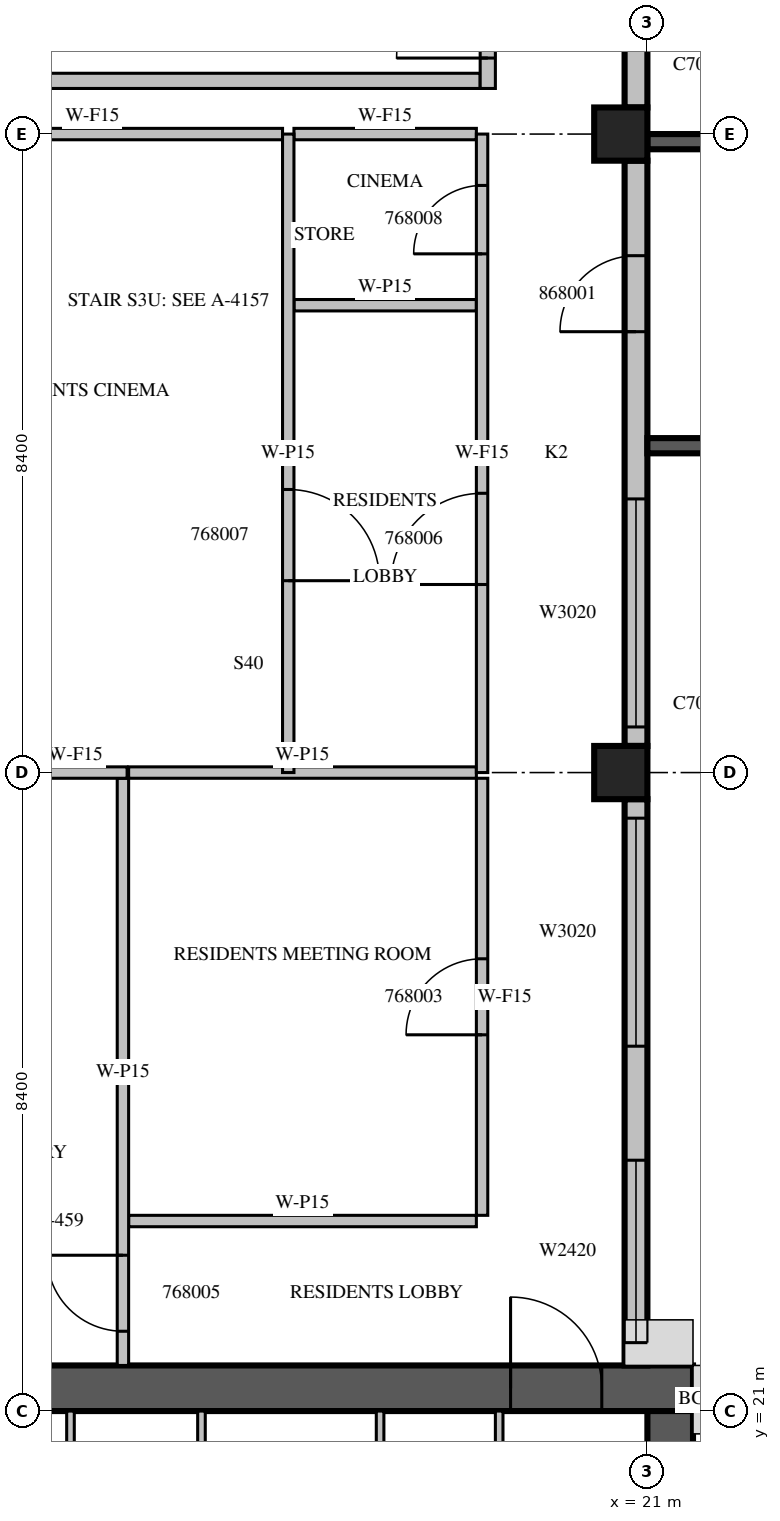
"""IFC4 building model, lengths in metres.
Left out: names, types, materials, properties, quantities, classifications, styles, units other than length and angle.
Written with IfcOpenShell. Run it as: python <this file> out.ifc"""

import sys

from ifc_helpers import new_model, si_unit, direction, frame, frame_2d, origin, origin_2d, place, context, subcontext, project, spatial, rectangle, extrude, source, transform, mapped, element, fill, save


model = new_model("IFC4")
c1 = context("Model", 3, precision=1e-05, world=origin(), true_north=direction((0.0, 1.0)))
c2 = subcontext(c1, "Body", "Model", "MODEL_VIEW")
j1 = project(units=[si_unit("LENGTHUNIT", "METRE"), si_unit("PLANEANGLEUNIT", "RADIAN")], contexts=[c1])
p1 = place(None, origin())
s1 = spatial("IfcSite", under=j1, at=p1, CompositionType="ELEMENT")
p2 = place(p1, origin())
s2 = spatial("IfcBuilding", under=s1, at=p2, CompositionType="ELEMENT")
p3 = place(p2, frame((0.0, 0.0, 298.5)))
s3 = spatial("IfcBuildingStorey", under=s2, at=p3, CompositionType="ELEMENT", Elevation=298.5)
m1 = source(origin(), c2, "Body", "SweptSolid", [
    extrude(rectangle(XDim=0.7, YDim=0.7, at=origin_2d()), origin(), (0.0, 0.0, 1.0), 3.5),
])
for number, where, z_axis, x_axis in (
    (1, (20.65, 29.4, 0.0), (0.0, 0.0, 1.0), (1.0, 0.0, 0.0)),
    (2, (20.65, 37.8, 0.0), (0.0, 0.0, 1.0), (1.0, 0.0, 0.0)),
):
    element("IfcColumn", number, at=place(p3, frame(where, z_axis=z_axis, x_axis=x_axis)), inside=s3, PredefinedType="COLUMN", context=c2, shape_type="MappedRepresentation", body=[
        mapped(m1, transform((0.0, 0.0, 0.0), scale=1.0)),
    ])
m2 = source(origin(), c2, "Body", "SweptSolid", [
    extrude(rectangle(XDim=11.1, YDim=0.6, at=frame_2d((5.55, 0.0))), origin(), (0.0, 0.0, 1.0), 3.5),
])
p4 = place(p3, frame((10.5, 21.3, 0.0), z_axis=(0.0, 0.0, 1.0), x_axis=(1.0, 0.0, 0.0)))
e3 = element("IfcWall", 3, at=p4, inside=s3, PredefinedType="SHEAR", context=c2, shape_type="MappedRepresentation", body=[
    mapped(m2, transform((0.0, 0.0, 0.0), scale=1.0)),
])
m3 = source(origin(), c2, "Body", "SweptSolid", [
    extrude(rectangle(XDim=1.2, YDim=2.1, at=frame_2d((0.6, 1.05))), frame((0.0, 0.31, 0.0), z_axis=(0.0, -1.0, 0.0), x_axis=(1.0, 0.0, 0.0)), (0.0, 0.0, 1.0), 0.62),
])
p5 = place(p4, frame((8.7, 0.0, 0.0)))
e4 = element("IfcOpeningElement", 4, at=p5, cuts=e3, PredefinedType="OPENING", context=c2, shape_type="MappedRepresentation", body=[
    mapped(m3, transform((0.0, 0.0, 0.0), scale=1.0)),
])
m4 = source(origin(), c2, "Body", "SweptSolid", [
    extrude(rectangle(XDim=10.5, YDim=0.6, at=frame_2d((5.25, 0.0))), origin(), (0.0, 0.0, 1.0), 3.5),
])
p6 = place(p3, frame((21.3, 10.5, 0.0), z_axis=(0.0, 0.0, 1.0), x_axis=(0.0, 1.0, 0.0)))
e5 = element("IfcWall", 5, at=p6, inside=s3, PredefinedType="SHEAR", context=c2, shape_type="MappedRepresentation", body=[
    mapped(m4, transform((0.0, 0.0, 0.0), scale=1.0)),
])
m5 = source(origin(), c2, "Body", "SweptSolid", [
    extrude(rectangle(XDim=1.2, YDim=2.4, at=frame_2d((0.6, 1.2))), frame((0.0, 0.31, 0.0), z_axis=(0.0, -1.0, 0.0), x_axis=(1.0, 0.0, 0.0)), (0.0, 0.0, 1.0), 0.62),
])
p7 = place(p6, frame((5.7, 0.0, 0.6)))
e6 = element("IfcOpeningElement", 6, at=p7, cuts=e5, PredefinedType="OPENING", context=c2, shape_type="MappedRepresentation", body=[
    mapped(m5, transform((0.0, 0.0, 0.0), scale=1.0)),
])
m6 = source(origin(), c2, "Body", "SweptSolid", [
    extrude(rectangle(XDim=7.45, YDim=0.3, at=frame_2d((3.725, 0.0))), origin(), (0.0, 0.0, 1.0), 3.1),
])
p8 = place(p3, frame((20.85, 21.6, 0.0), z_axis=(0.0, 0.0, 1.0), x_axis=(0.0, 1.0, 0.0)))
e7 = element("IfcWall", 7, at=p8, inside=s3, PredefinedType="STANDARD", context=c2, shape_type="MappedRepresentation", body=[
    mapped(m6, transform((0.0, 0.0, 0.0), scale=1.0)),
])
m7 = source(origin(), c2, "Body", "SweptSolid", [
    extrude(rectangle(XDim=2.4, YDim=2.0, at=frame_2d((1.2, 1.0))), frame((0.0, 0.16, 0.0), z_axis=(0.0, -1.0, 0.0), x_axis=(1.0, 0.0, 0.0)), (0.0, 0.0, 1.0), 0.32),
])
p9 = place(p8, frame((0.3, 0.0, 0.6)))
e8 = element("IfcOpeningElement", 8, at=p9, cuts=e7, PredefinedType="OPENING", context=c2, shape_type="MappedRepresentation", body=[
    mapped(m7, transform((0.0, 0.0, 0.0), scale=1.0)),
])
m8 = source(origin(), c2, "Body", "SweptSolid", [
    extrude(rectangle(XDim=3.0, YDim=2.0, at=frame_2d((1.5, 1.0))), frame((0.0, 0.16, 0.0), z_axis=(0.0, -1.0, 0.0), x_axis=(1.0, 0.0, 0.0)), (0.0, 0.0, 1.0), 0.32),
])
p10 = place(p8, frame((4.2, 0.0, 0.6)))
e9 = element("IfcOpeningElement", 9, at=p10, cuts=e7, PredefinedType="OPENING", context=c2, shape_type="MappedRepresentation", body=[
    mapped(m8, transform((0.0, 0.0, 0.0), scale=1.0)),
])
m9 = source(origin(), c2, "Body", "SweptSolid", [
    extrude(rectangle(XDim=7.7, YDim=0.3, at=frame_2d((3.85, 0.0))), origin(), (0.0, 0.0, 1.0), 3.1),
])
p11 = place(p3, frame((20.85, 29.75, 0.0), z_axis=(0.0, 0.0, 1.0), x_axis=(0.0, 1.0, 0.0)))
e10 = element("IfcWall", 10, at=p11, inside=s3, PredefinedType="STANDARD", context=c2, shape_type="MappedRepresentation", body=[
    mapped(m9, transform((0.0, 0.0, 0.0), scale=1.0)),
])
p12 = place(p11, frame((0.25, 0.0, 0.6)))
e11 = element("IfcOpeningElement", 11, at=p12, cuts=e10, PredefinedType="OPENING", context=c2, shape_type="MappedRepresentation", body=[
    mapped(m8, transform((0.0, 0.0, 0.0), scale=1.0)),
])
m10 = source(origin(), c2, "Body", "SweptSolid", [
    extrude(rectangle(XDim=1.0, YDim=2.1, at=frame_2d((0.5, 1.05))), frame((0.0, 0.16, 0.0), z_axis=(0.0, -1.0, 0.0), x_axis=(1.0, 0.0, 0.0)), (0.0, 0.0, 1.0), 0.32),
])
p13 = place(p11, frame((5.45, 0.0, 0.0)))
e12 = element("IfcOpeningElement", 12, at=p13, cuts=e10, PredefinedType="OPENING", context=c2, shape_type="MappedRepresentation", body=[
    mapped(m10, transform((0.0, 0.0, 0.0), scale=1.0)),
])
m11 = source(origin(), c2, "Body", "SweptSolid", [
    extrude(rectangle(XDim=5.53, YDim=0.3, at=frame_2d((2.765, 0.0))), origin(), (0.0, 0.0, 1.0), 3.1),
])
p14 = place(p3, frame((20.85, 38.15, 0.0), z_axis=(0.0, 0.0, 1.0), x_axis=(0.0, 1.0, 0.0)))
e13 = element("IfcWall", 13, at=p14, inside=s3, PredefinedType="STANDARD", context=c2, shape_type="MappedRepresentation", body=[
    mapped(m11, transform((0.0, 0.0, 0.0), scale=1.0)),
])
m12 = source(origin(), c2, "Body", "SweptSolid", [
    extrude(rectangle(XDim=3.6, YDim=2.0, at=frame_2d((1.8, 1.0))), frame((0.0, 0.16, 0.0), z_axis=(0.0, -1.0, 0.0), x_axis=(1.0, 0.0, 0.0)), (0.0, 0.0, 1.0), 0.32),
])
p15 = place(p14, frame((0.79, 0.0, 0.6)))
e14 = element("IfcOpeningElement", 14, at=p15, cuts=e13, PredefinedType="OPENING", context=c2, shape_type="MappedRepresentation", body=[
    mapped(m12, transform((0.0, 0.0, 0.0), scale=1.0)),
])
m13 = source(origin(), c2, "Body", "SweptSolid", [
    extrude(rectangle(XDim=3.9, YDim=0.2, at=frame_2d((1.95, 0.0))), origin(), (0.0, 0.0, 1.0), 3.09),
])
p16 = place(p3, frame((21.0, 33.7, 0.0), z_axis=(0.0, 0.0, 1.0), x_axis=(1.0, 0.0, 0.0)))
e15 = element("IfcWall", 15, at=p16, inside=s3, PredefinedType="SOLIDWALL", context=c2, shape_type="MappedRepresentation", body=[
    mapped(m13, transform((0.0, 0.0, 0.0), scale=1.0)),
])
m14 = source(origin(), c2, "Body", "SweptSolid", [
    extrude(rectangle(XDim=2.4, YDim=2.0, at=frame_2d((1.2, 1.0))), frame((0.0, 0.11, 0.0), z_axis=(0.0, -1.0, 0.0), x_axis=(1.0, 0.0, 0.0)), (0.0, 0.0, 1.0), 0.22),
])
p17 = place(p16, frame((0.75, 0.0, 0.6)))
e16 = element("IfcOpeningElement", 16, at=p17, cuts=e15, PredefinedType="OPENING", context=c2, shape_type="MappedRepresentation", body=[
    mapped(m14, transform((0.0, 0.0, 0.0), scale=1.0)),
])
p18 = place(p3, frame((21.0, 37.7, 0.0), z_axis=(0.0, 0.0, 1.0), x_axis=(1.0, 0.0, 0.0)))
e17 = element("IfcWall", 17, at=p18, inside=s3, PredefinedType="SOLIDWALL", context=c2, shape_type="MappedRepresentation", body=[
    mapped(m13, transform((0.0, 0.0, 0.0), scale=1.0)),
])
p19 = place(p18, frame((0.75, 0.0, 0.6)))
e18 = element("IfcOpeningElement", 18, at=p19, cuts=e17, PredefinedType="OPENING", context=c2, shape_type="MappedRepresentation", body=[
    mapped(m14, transform((0.0, 0.0, 0.0), scale=1.0)),
])
m15 = source(origin(), c2, "Body", "SweptSolid", [
    extrude(rectangle(XDim=1.3, YDim=0.1, at=frame_2d((0.65, 0.0))), origin(), (0.0, 0.0, 1.0), 3.1),
])
for number, where, z_axis, x_axis in (
    (19, (13.41, 19.7, 0.0), (0.0, 0.0, 1.0), (0.0, 1.0, 0.0)),
    (20, (15.133, 19.7, 0.0), (0.0, 0.0, 1.0), (0.0, 1.0, 0.0)),
    (21, (17.483, 19.7, 0.0), (0.0, 0.0, 1.0), (0.0, 1.0, 0.0)),
    (22, (19.05, 19.7, 0.0), (0.0, 0.0, 1.0), (0.0, 1.0, 0.0)),
):
    element("IfcWall", number, at=place(p3, frame(where, z_axis=z_axis, x_axis=x_axis)), inside=s3, PredefinedType="PARTITIONING", context=c2, shape_type="MappedRepresentation", body=[
        mapped(m15, transform((0.0, 0.0, 0.0), scale=1.0)),
    ])
m16 = source(origin(), c2, "Body", "SweptSolid", [
    extrude(rectangle(XDim=8.0, YDim=0.2, at=frame_2d((4.0, 0.0))), origin(), (0.0, 0.0, 1.0), 3.1),
])
p20 = place(p3, frame((10.8, 38.5, 0.0), z_axis=(0.0, 0.0, 1.0), x_axis=(1.0, 0.0, 0.0)))
e23 = element("IfcWall", 23, at=p20, inside=s3, PredefinedType="PARTITIONING", context=c2, shape_type="MappedRepresentation", body=[
    mapped(m16, transform((0.0, 0.0, 0.0), scale=1.0)),
])
m17 = source(origin(), c2, "Body", "SweptSolid", [
    extrude(rectangle(XDim=5.45, YDim=0.2, at=frame_2d((2.725, 0.0))), origin(), (0.0, 0.0, 1.0), 3.1),
])
p21 = place(p3, frame((18.9, 38.4, 0.0), z_axis=(0.0, 0.0, 1.0), x_axis=(0.0, 1.0, 0.0)))
e24 = element("IfcWall", 24, at=p21, inside=s3, PredefinedType="PARTITIONING", context=c2, shape_type="MappedRepresentation", body=[
    mapped(m17, transform((0.0, 0.0, 0.0), scale=1.0)),
])
m18 = source(origin(), c2, "Body", "SweptSolid", [
    extrude(rectangle(XDim=1.2, YDim=2.1, at=frame_2d((0.6, 1.05))), frame((0.0, 0.11, 0.0), z_axis=(0.0, -1.0, 0.0), x_axis=(1.0, 0.0, 0.0)), (0.0, 0.0, 1.0), 0.22),
])
p22 = place(p21, frame((0.4, 0.0, 0.0)))
e25 = element("IfcOpeningElement", 25, at=p22, cuts=e24, PredefinedType="OPENING", context=c2, shape_type="MappedRepresentation", body=[
    mapped(m18, transform((0.0, 0.0, 0.0), scale=1.0)),
])
m19 = source(origin(), c2, "Body", "SweptSolid", [
    extrude(rectangle(XDim=0.9, YDim=2.1, at=frame_2d((0.45, 1.05))), frame((0.0, 0.11, 0.0), z_axis=(0.0, -1.0, 0.0), x_axis=(1.0, 0.0, 0.0)), (0.0, 0.0, 1.0), 0.22),
])
p23 = place(p21, frame((3.25, 0.0, 0.0)))
e26 = element("IfcOpeningElement", 26, at=p23, cuts=e24, PredefinedType="OPENING", context=c2, shape_type="MappedRepresentation", body=[
    mapped(m19, transform((0.0, 0.0, 0.0), scale=1.0)),
])
m20 = source(origin(), c2, "Body", "SweptSolid", [
    extrude(rectangle(XDim=4.575, YDim=0.15, at=frame_2d((2.288, 0.0))), origin(), (0.0, 0.0, 1.0), 3.1),
])
for number, where, z_axis, x_axis in (
    (27, (14.175, 23.5, 0.0), (0.0, 0.0, 1.0), (1.0, 0.0, 0.0)),
    (28, (18.75, 29.4, 0.0), (0.0, 0.0, 1.0), (-1.0, 0.0, 0.0)),
):
    element("IfcWall", number, at=place(p3, frame(where, z_axis=z_axis, x_axis=x_axis)), inside=s3, PredefinedType="PARTITIONING", context=c2, shape_type="MappedRepresentation", body=[
        mapped(m20, transform((0.0, 0.0, 0.0), scale=1.0)),
    ])
m21 = source(origin(), c2, "Body", "SweptSolid", [
    extrude(rectangle(XDim=5.75, YDim=0.15, at=frame_2d((2.875, 0.0))), origin(), (0.0, 0.0, 1.0), 3.1),
])
p24 = place(p3, frame((18.825, 23.575, 0.0), z_axis=(0.0, 0.0, 1.0), x_axis=(0.0, 1.0, 0.0)))
e29 = element("IfcWall", 29, at=p24, inside=s3, PredefinedType="PARTITIONING", context=c2, shape_type="MappedRepresentation", body=[
    mapped(m21, transform((0.0, 0.0, 0.0), scale=1.0)),
])
m22 = source(origin(), c2, "Body", "SweptSolid", [
    extrude(rectangle(XDim=1.0, YDim=2.1, at=frame_2d((0.5, 1.05))), frame((0.0, 0.085, 0.0), z_axis=(0.0, -1.0, 0.0), x_axis=(1.0, 0.0, 0.0)), (0.0, 0.0, 1.0), 0.17),
])
p25 = place(p24, frame((2.375, 0.0, 0.0)))
e30 = element("IfcOpeningElement", 30, at=p25, cuts=e29, PredefinedType="OPENING", context=c2, shape_type="MappedRepresentation", body=[
    mapped(m22, transform((0.0, 0.0, 0.0), scale=1.0)),
])
m23 = source(origin(), c2, "Body", "SweptSolid", [
    extrude(rectangle(XDim=7.725, YDim=0.15, at=frame_2d((3.862, 0.0))), origin(), (0.0, 0.0, 1.0), 3.1),
])
p26 = place(p3, frame((14.1, 29.325, 0.0), z_axis=(0.0, 0.0, 1.0), x_axis=(0.0, -1.0, 0.0)))
e31 = element("IfcWall", 31, at=p26, inside=s3, PredefinedType="PARTITIONING", context=c2, shape_type="MappedRepresentation", body=[
    mapped(m23, transform((0.0, 0.0, 0.0), scale=1.0)),
])
p27 = place(p26, frame((6.275, 0.0, 0.0)))
e32 = element("IfcOpeningElement", 32, at=p27, cuts=e31, PredefinedType="OPENING", context=c2, shape_type="MappedRepresentation", body=[
    mapped(m22, transform((0.0, 0.0, 0.0), scale=1.0)),
])
m24 = source(origin(), c2, "Body", "SweptSolid", [
    extrude(rectangle(XDim=2.4, YDim=0.15, at=frame_2d((1.2, 0.0))), origin(), (0.0, 0.0, 1.0), 3.1),
])
p28 = place(p3, frame((18.75, 35.548, 0.0), z_axis=(0.0, 0.0, 1.0), x_axis=(-1.0, 0.0, 0.0)))
e33 = element("IfcWall", 33, at=p28, inside=s3, PredefinedType="PARTITIONING", context=c2, shape_type="MappedRepresentation", body=[
    mapped(m24, transform((0.0, 0.0, 0.0), scale=1.0)),
])
m25 = source(origin(), c2, "Body", "SweptSolid", [
    extrude(rectangle(XDim=1.35, YDim=0.15, at=frame_2d((0.675, 0.0))), origin(), (0.0, 0.0, 1.0), 3.1),
])
p29 = place(p3, frame((14.155, 29.4, 0.0), z_axis=(0.0, 0.0, 1.0), x_axis=(-1.0, 0.0, 0.0)))
e34 = element("IfcWall", 34, at=p29, inside=s3, PredefinedType="PARTITIONING", context=c2, shape_type="MappedRepresentation", body=[
    mapped(m25, transform((0.0, 0.0, 0.0), scale=1.0)),
])
m26 = source(origin(), c2, "Body", "SweptSolid", [
    extrude(rectangle(XDim=5.001, YDim=0.15, at=frame_2d((2.501, 0.0))), origin(), (0.0, 0.0, 1.0), 3.1),
])
p30 = place(p3, frame((16.2, 37.8, 0.0), z_axis=(0.0, 0.0, 1.0), x_axis=(-1.0, 0.0, 0.0)))
e35 = element("IfcWall", 35, at=p30, inside=s3, PredefinedType="PARTITIONING", context=c2, shape_type="MappedRepresentation", body=[
    mapped(m26, transform((0.0, 0.0, 0.0), scale=1.0)),
])
p31 = place(p3, frame((18.75, 37.8, 0.0), z_axis=(0.0, 0.0, 1.0), x_axis=(-1.0, 0.0, 0.0)))
e36 = element("IfcWall", 36, at=p31, inside=s3, PredefinedType="PARTITIONING", context=c2, shape_type="MappedRepresentation", body=[
    mapped(m24, transform((0.0, 0.0, 0.0), scale=1.0)),
])
m27 = source(origin(), c2, "Body", "SweptSolid", [
    extrude(rectangle(XDim=8.4, YDim=0.15, at=frame_2d((4.2, 0.0))), origin(), (0.0, 0.0, 1.0), 3.1),
])
p32 = place(p3, frame((16.275, 29.4, 0.0), z_axis=(0.0, 0.0, 1.0), x_axis=(0.0, 1.0, 0.0)))
e37 = element("IfcWall", 37, at=p32, inside=s3, PredefinedType="PARTITIONING", context=c2, shape_type="MappedRepresentation", body=[
    mapped(m27, transform((0.0, 0.0, 0.0), scale=1.0)),
])
m28 = source(origin(), c2, "Body", "SweptSolid", [
    extrude(rectangle(XDim=1.2, YDim=2.1, at=frame_2d((0.6, 1.05))), frame((0.0, 0.085, 0.0), z_axis=(0.0, -1.0, 0.0), x_axis=(1.0, 0.0, 0.0)), (0.0, 0.0, 1.0), 0.17),
])
p33 = place(p32, frame((2.524, 0.0, 0.0)))
e38 = element("IfcOpeningElement", 38, at=p33, cuts=e37, PredefinedType="OPENING", context=c2, shape_type="MappedRepresentation", body=[
    mapped(m28, transform((0.0, 0.0, 0.0), scale=1.0)),
])
p34 = place(p3, frame((18.825, 29.4, 0.0), z_axis=(0.0, 0.0, 1.0), x_axis=(0.0, 1.0, 0.0)))
e39 = element("IfcWall", 39, at=p34, inside=s3, PredefinedType="PARTITIONING", context=c2, shape_type="MappedRepresentation", body=[
    mapped(m27, transform((0.0, 0.0, 0.0), scale=1.0)),
])
p35 = place(p34, frame((2.474, 0.0, 0.0)))
e40 = element("IfcOpeningElement", 40, at=p35, cuts=e39, PredefinedType="OPENING", context=c2, shape_type="MappedRepresentation", body=[
    mapped(m28, transform((0.0, 0.0, 0.0), scale=1.0)),
])
m29 = source(origin(), c2, "Body", "SweptSolid", [
    extrude(rectangle(XDim=0.9, YDim=2.1, at=frame_2d((0.45, 1.05))), frame((0.0, 0.085, 0.0), z_axis=(0.0, -1.0, 0.0), x_axis=(1.0, 0.0, 0.0)), (0.0, 0.0, 1.0), 0.17),
])
p36 = place(p34, frame((6.824, 0.0, 0.0)))
e41 = element("IfcOpeningElement", 41, at=p36, cuts=e39, PredefinedType="OPENING", context=c2, shape_type="MappedRepresentation", body=[
    mapped(m29, transform((0.0, 0.0, 0.0), scale=1.0)),
])
m30 = source(origin(), c2, "Body", "SweptSolid", [
    extrude(rectangle(XDim=2.4, YDim=2.0, at=frame_2d((1.2, 1.0))), frame((0.0, 0.03, 0.0), z_axis=(0.0, -1.0, 0.0), x_axis=(1.0, 0.0, 0.0)), (0.0, 0.0, 1.0), 0.06),
])
p37 = place(p9, origin())
e42 = element("IfcWindow", 42, at=p37, inside=s3, PartitioningType="SINGLE_PANEL", PredefinedType="WINDOW", context=c2, shape_type="MappedRepresentation", body=[
    mapped(m30, transform((0.0, 0.0, 0.0), scale=1.0)),
])
fill(e8, e42)
m31 = source(origin(), c2, "Body", "SweptSolid", [
    extrude(rectangle(XDim=3.0, YDim=2.0, at=frame_2d((1.5, 1.0))), frame((0.0, 0.03, 0.0), z_axis=(0.0, -1.0, 0.0), x_axis=(1.0, 0.0, 0.0)), (0.0, 0.0, 1.0), 0.06),
])
p38 = place(p10, origin())
e43 = element("IfcWindow", 43, at=p38, inside=s3, PartitioningType="SINGLE_PANEL", PredefinedType="WINDOW", context=c2, shape_type="MappedRepresentation", body=[
    mapped(m31, transform((0.0, 0.0, 0.0), scale=1.0)),
])
fill(e9, e43)
p39 = place(p12, origin())
e44 = element("IfcWindow", 44, at=p39, inside=s3, PartitioningType="SINGLE_PANEL", PredefinedType="WINDOW", context=c2, shape_type="MappedRepresentation", body=[
    mapped(m31, transform((0.0, 0.0, 0.0), scale=1.0)),
])
fill(e11, e44)
m32 = source(origin(), c2, "Body", "SweptSolid", [
    extrude(rectangle(XDim=1.2, YDim=2.1, at=frame_2d((0.6, 1.05))), frame((0.0, 0.025, 0.0), z_axis=(0.0, -1.0, 0.0), x_axis=(1.0, 0.0, 0.0)), (0.0, 0.0, 1.0), 0.05),
])
p40 = place(p22, origin())
e45 = element("IfcDoor", 45, at=p40, inside=s3, OperationType="SINGLE_SWING_LEFT", PredefinedType="DOOR", context=c2, shape_type="MappedRepresentation", body=[
    mapped(m32, transform((0.0, 0.0, 0.0), scale=1.0)),
])
fill(e25, e45)
p41 = place(p5, origin())
e46 = element("IfcDoor", 46, at=p41, inside=s3, OperationType="SINGLE_SWING_LEFT", PredefinedType="DOOR", context=c2, shape_type="MappedRepresentation", body=[
    mapped(m32, transform((0.0, 0.0, 0.0), scale=1.0)),
])
fill(e4, e46)
m33 = source(origin(), c2, "Body", "SweptSolid", [
    extrude(rectangle(XDim=1.0, YDim=2.1, at=frame_2d((0.5, 1.05))), frame((0.0, 0.025, 0.0), z_axis=(0.0, -1.0, 0.0), x_axis=(1.0, 0.0, 0.0)), (0.0, 0.0, 1.0), 0.05),
])
p42 = place(p25, origin())
e47 = element("IfcDoor", 47, at=p42, inside=s3, OperationType="SINGLE_SWING_LEFT", PredefinedType="DOOR", context=c2, shape_type="MappedRepresentation", body=[
    mapped(m33, transform((0.0, 0.0, 0.0), scale=1.0)),
])
fill(e30, e47)
p43 = place(p27, origin())
e48 = element("IfcDoor", 48, at=p43, inside=s3, OperationType="SINGLE_SWING_RIGHT", PredefinedType="DOOR", context=c2, shape_type="MappedRepresentation", body=[
    mapped(m33, transform((0.0, 0.0, 0.0), scale=1.0)),
])
fill(e32, e48)
p44 = place(p35, origin())
e49 = element("IfcDoor", 49, at=p44, inside=s3, OperationType="SINGLE_SWING_LEFT", PredefinedType="DOOR", context=c2, shape_type="MappedRepresentation", body=[
    mapped(m32, transform((0.0, 0.0, 0.0), scale=1.0)),
])
fill(e40, e49)
p45 = place(p33, origin())
e50 = element("IfcDoor", 50, at=p45, inside=s3, OperationType="SINGLE_SWING_RIGHT", PredefinedType="DOOR", context=c2, shape_type="MappedRepresentation", body=[
    mapped(m32, transform((0.0, 0.0, 0.0), scale=1.0)),
])
fill(e38, e50)
m34 = source(origin(), c2, "Body", "SweptSolid", [
    extrude(rectangle(XDim=0.9, YDim=2.1, at=frame_2d((0.45, 1.05))), frame((0.0, 0.025, 0.0), z_axis=(0.0, -1.0, 0.0), x_axis=(1.0, 0.0, 0.0)), (0.0, 0.0, 1.0), 0.05),
])
p46 = place(p36, origin())
e51 = element("IfcDoor", 51, at=p46, inside=s3, OperationType="SINGLE_SWING_LEFT", PredefinedType="DOOR", context=c2, shape_type="MappedRepresentation", body=[
    mapped(m34, transform((0.0, 0.0, 0.0), scale=1.0)),
])
fill(e41, e51)
p47 = place(p13, origin())
e52 = element("IfcDoor", 52, at=p47, inside=s3, OperationType="SINGLE_SWING_LEFT", PredefinedType="DOOR", context=c2, shape_type="MappedRepresentation", body=[
    mapped(m33, transform((0.0, 0.0, 0.0), scale=1.0)),
])
fill(e12, e52)
save(model, sys.argv[1])
